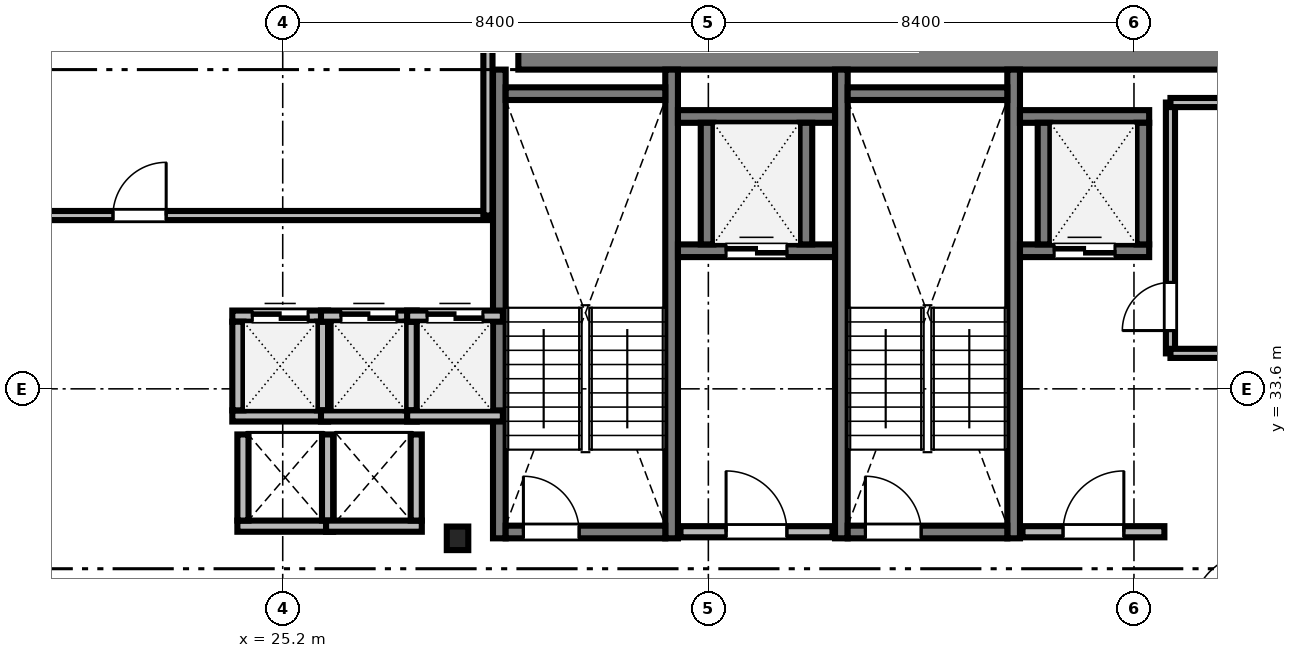
"""IFC4 building model, lengths in metres.
Left out: names, types, materials, properties, quantities, classifications, styles, units other than length and angle.
Written with IfcOpenShell. Run it as: python <this file> out.ifc"""

import sys

from ifc_helpers import new_model, si_unit, direction, frame, frame_2d, origin, origin_2d, place, context, subcontext, project, spatial, rectangle, i_section, extrude, source, transform, mapped, element, fill, save


model = new_model("IFC4")
c1 = context("Model", 3, precision=1e-05, world=origin(), true_north=direction((0.0, 1.0)))
c2 = subcontext(c1, "Body", "Model", "MODEL_VIEW")
j1 = project(units=[si_unit("LENGTHUNIT", "METRE"), si_unit("PLANEANGLEUNIT", "RADIAN")], contexts=[c1])
p1 = place(None, origin())
s1 = spatial("IfcSite", under=j1, at=p1, CompositionType="ELEMENT")
p2 = place(p1, origin())
s2 = spatial("IfcBuilding", under=s1, at=p2, CompositionType="ELEMENT")
p3 = place(p2, frame((0.0, 0.0, 122.4)))
s3 = spatial("IfcBuildingStorey", under=s2, at=p3, CompositionType="ELEMENT", Elevation=122.4)
m1 = source(origin(), c2, "Body", "SweptSolid", [
    extrude(rectangle(XDim=17.52, YDim=0.8, at=frame_2d((8.76, 0.0))), origin(), (0.0, 0.0, 1.0), 3.46),
])
p4 = place(p3, frame((29.85, 40.3, 0.0), z_axis=(0.0, 0.0, 1.0), x_axis=(1.0, 0.0, 0.0)))
e1 = element("IfcWall", 1, at=p4, inside=s3, PredefinedType="SHEAR", context=c2, shape_type="MappedRepresentation", body=[
    mapped(m1, transform((0.0, 0.0, 0.0), scale=1.0)),
])
m2 = source(origin(), c2, "Body", "SweptSolid", [
    extrude(i_section(OverallWidth=0.424, OverallDepth=0.465, WebThickness=0.035, FlangeThickness=0.056, FilletRadius=0.015, at=origin_2d()), origin(), (0.0, 0.0, 1.0), 3.46),
])
p5 = place(p3, frame((28.65, 30.65, 0.0), z_axis=(0.0, 0.0, 1.0), x_axis=(1.0, 0.0, 0.0)))
e2 = element("IfcColumn", 2, at=p5, inside=s3, PredefinedType="COLUMN", context=c2, shape_type="MappedRepresentation", body=[
    mapped(m2, transform((0.0, 0.0, 0.0), scale=1.0)),
])
m3 = source(origin(), c2, "Body", "SweptSolid", [
    extrude(rectangle(XDim=9.25, YDim=0.25, at=frame_2d((4.625, 0.0))), origin(), (0.0, 0.0, 1.0), 3.5),
])
for number, where, z_axis, x_axis in (
    (3, (29.475, 30.65, 0.0), (0.0, 0.0, 1.0), (0.0, 1.0, 0.0)),
    (4, (32.875, 30.65, 0.0), (0.0, 0.0, 1.0), (0.0, 1.0, 0.0)),
):
    element("IfcWall", number, at=place(p3, frame(where, z_axis=z_axis, x_axis=x_axis)), inside=s3, PredefinedType="SOLIDWALL", context=c2, shape_type="MappedRepresentation", body=[
        mapped(m3, transform((0.0, 0.0, 0.0), scale=1.0)),
    ])
m4 = source(origin(), c2, "Body", "SweptSolid", [
    extrude(rectangle(XDim=3.15, YDim=0.25, at=frame_2d((1.575, 0.0))), origin(), (0.0, 0.0, 1.0), 3.5),
])
p6 = place(p3, frame((29.6, 39.425, 0.0), z_axis=(0.0, 0.0, 1.0), x_axis=(1.0, 0.0, 0.0)))
e5 = element("IfcWall", 5, at=p6, inside=s3, PredefinedType="SOLIDWALL", context=c2, shape_type="MappedRepresentation", body=[
    mapped(m4, transform((0.0, 0.0, 0.0), scale=1.0)),
])
p7 = place(p3, frame((29.6, 30.775, 0.0), z_axis=(0.0, 0.0, 1.0), x_axis=(1.0, 0.0, 0.0)))
e6 = element("IfcWall", 6, at=p7, inside=s3, PredefinedType="SOLIDWALL", context=c2, shape_type="MappedRepresentation", body=[
    mapped(m4, transform((0.0, 0.0, 0.0), scale=1.0)),
])
m5 = source(origin(), c2, "Body", "SweptSolid", [
    extrude(rectangle(XDim=1.1, YDim=2.2, at=frame_2d((0.55, 1.1))), frame((0.0, 0.135, 0.0), z_axis=(0.0, -1.0, 0.0), x_axis=(1.0, 0.0, 0.0)), (0.0, 0.0, 1.0), 0.27),
])
p8 = place(p7, frame((0.35, 0.0, 0.0)))
e7 = element("IfcOpeningElement", 7, at=p8, cuts=e6, PredefinedType="OPENING", context=c2, shape_type="MappedRepresentation", body=[
    mapped(m5, transform((0.0, 0.0, 0.0), scale=1.0)),
])
for number, where, z_axis, x_axis in (
    (8, (36.225, 30.65, 0.0), (0.0, 0.0, 1.0), (0.0, 1.0, 0.0)),
    (9, (39.625, 30.65, 0.0), (0.0, 0.0, 1.0), (0.0, 1.0, 0.0)),
):
    element("IfcWall", number, at=place(p3, frame(where, z_axis=z_axis, x_axis=x_axis)), inside=s3, PredefinedType="SOLIDWALL", context=c2, shape_type="MappedRepresentation", body=[
        mapped(m3, transform((0.0, 0.0, 0.0), scale=1.0)),
    ])
p9 = place(p3, frame((36.35, 39.425, 0.0), z_axis=(0.0, 0.0, 1.0), x_axis=(1.0, 0.0, 0.0)))
e10 = element("IfcWall", 10, at=p9, inside=s3, PredefinedType="SOLIDWALL", context=c2, shape_type="MappedRepresentation", body=[
    mapped(m4, transform((0.0, 0.0, 0.0), scale=1.0)),
])
p10 = place(p3, frame((36.35, 30.775, 0.0), z_axis=(0.0, 0.0, 1.0), x_axis=(1.0, 0.0, 0.0)))
e11 = element("IfcWall", 11, at=p10, inside=s3, PredefinedType="SOLIDWALL", context=c2, shape_type="MappedRepresentation", body=[
    mapped(m4, transform((0.0, 0.0, 0.0), scale=1.0)),
])
p11 = place(p10, frame((0.35, 0.0, 0.0)))
e12 = element("IfcOpeningElement", 12, at=p11, cuts=e11, PredefinedType="OPENING", context=c2, shape_type="MappedRepresentation", body=[
    mapped(m5, transform((0.0, 0.0, 0.0), scale=1.0)),
])
m6 = source(origin(), c2, "Body", "SweptSolid", [
    extrude(rectangle(XDim=3.0, YDim=0.22, at=frame_2d((1.5, 0.0))), origin(), (0.0, 0.0, 1.0), 3.46),
])
p12 = place(p3, frame((33.05, 30.78, 0.0), z_axis=(0.0, 0.0, 1.0), x_axis=(1.0, 0.0, 0.0)))
e13 = element("IfcWall", 13, at=p12, inside=s3, PredefinedType="SOLIDWALL", context=c2, shape_type="MappedRepresentation", body=[
    mapped(m6, transform((0.0, 0.0, 0.0), scale=1.0)),
])
m7 = source(origin(), c2, "Body", "SweptSolid", [
    extrude(rectangle(XDim=1.2, YDim=2.2, at=frame_2d((0.6, 1.1))), frame((0.0, 0.12, 0.0), z_axis=(0.0, -1.0, 0.0), x_axis=(1.0, 0.0, 0.0)), (0.0, 0.0, 1.0), 0.24),
])
p13 = place(p12, frame((0.9, 0.0, 0.0)))
e14 = element("IfcOpeningElement", 14, at=p13, cuts=e13, PredefinedType="OPENING", context=c2, shape_type="MappedRepresentation", body=[
    mapped(m7, transform((0.0, 0.0, 0.0), scale=1.0)),
])
m8 = source(origin(), c2, "Body", "SweptSolid", [
    extrude(rectangle(XDim=2.8, YDim=0.22, at=frame_2d((1.4, 0.0))), origin(), (0.0, 0.0, 1.0), 3.46),
])
p14 = place(p3, frame((39.8, 30.78, 0.0), z_axis=(0.0, 0.0, 1.0), x_axis=(1.0, 0.0, 0.0)))
e15 = element("IfcWall", 15, at=p14, inside=s3, PredefinedType="SOLIDWALL", context=c2, shape_type="MappedRepresentation", body=[
    mapped(m8, transform((0.0, 0.0, 0.0), scale=1.0)),
])
p15 = place(p14, frame((0.8, 0.0, 0.0)))
e16 = element("IfcOpeningElement", 16, at=p15, cuts=e15, PredefinedType="OPENING", context=c2, shape_type="MappedRepresentation", body=[
    mapped(m7, transform((0.0, 0.0, 0.0), scale=1.0)),
])
m9 = source(origin(), c2, "Body", "SweptSolid", [
    extrude(rectangle(XDim=1.89, YDim=0.22, at=frame_2d((0.945, 0.0))), origin(), (0.0, 0.0, 1.0), 3.46),
])
p16 = place(p3, frame((24.205, 33.065, 0.0), z_axis=(0.0, 0.0, 1.0), x_axis=(1.0, 0.0, 0.0)))
e17 = element("IfcWall", 17, at=p16, inside=s3, PredefinedType="SOLIDWALL", context=c2, shape_type="MappedRepresentation", body=[
    mapped(m9, transform((0.0, 0.0, 0.0), scale=1.0)),
])
p17 = place(p3, frame((24.205, 35.035, 0.0), z_axis=(0.0, 0.0, 1.0), x_axis=(1.0, 0.0, 0.0)))
e18 = element("IfcWall", 18, at=p17, inside=s3, PredefinedType="SOLIDWALL", context=c2, shape_type="MappedRepresentation", body=[
    mapped(m9, transform((0.0, 0.0, 0.0), scale=1.0)),
])
m10 = source(origin(), c2, "Body", "SweptSolid", [
    extrude(rectangle(XDim=1.1, YDim=2.2, at=frame_2d((0.55, 1.1))), frame((0.0, 0.12, 0.0), z_axis=(0.0, -1.0, 0.0), x_axis=(1.0, 0.0, 0.0)), (0.0, 0.0, 1.0), 0.24),
])
p18 = place(p17, frame((0.395, 0.0, 0.0)))
e19 = element("IfcOpeningElement", 19, at=p18, cuts=e18, PredefinedType="OPENING", context=c2, shape_type="MappedRepresentation", body=[
    mapped(m10, transform((0.0, 0.0, 0.0), scale=1.0)),
])
m11 = source(origin(), c2, "Body", "SweptSolid", [
    extrude(rectangle(XDim=1.75, YDim=0.22, at=frame_2d((0.875, 0.0))), origin(), (0.0, 0.0, 1.0), 3.46),
])
for number, where, z_axis, x_axis in (
    (20, (24.315, 33.175, 0.0), (0.0, 0.0, 1.0), (0.0, 1.0, 0.0)),
    (21, (25.985, 33.175, 0.0), (0.0, 0.0, 1.0), (0.0, 1.0, 0.0)),
):
    element("IfcWall", number, at=place(p3, frame(where, z_axis=z_axis, x_axis=x_axis)), inside=s3, PredefinedType="SOLIDWALL", context=c2, shape_type="MappedRepresentation", body=[
        mapped(m11, transform((0.0, 0.0, 0.0), scale=1.0)),
    ])
p19 = place(p3, frame((25.955, 33.065, 0.0), z_axis=(0.0, 0.0, 1.0), x_axis=(1.0, 0.0, 0.0)))
e22 = element("IfcWall", 22, at=p19, inside=s3, PredefinedType="SOLIDWALL", context=c2, shape_type="MappedRepresentation", body=[
    mapped(m9, transform((0.0, 0.0, 0.0), scale=1.0)),
])
p20 = place(p3, frame((25.955, 35.035, 0.0), z_axis=(0.0, 0.0, 1.0), x_axis=(1.0, 0.0, 0.0)))
e23 = element("IfcWall", 23, at=p20, inside=s3, PredefinedType="SOLIDWALL", context=c2, shape_type="MappedRepresentation", body=[
    mapped(m9, transform((0.0, 0.0, 0.0), scale=1.0)),
])
p21 = place(p20, frame((0.395, 0.0, 0.0)))
e24 = element("IfcOpeningElement", 24, at=p21, cuts=e23, PredefinedType="OPENING", context=c2, shape_type="MappedRepresentation", body=[
    mapped(m10, transform((0.0, 0.0, 0.0), scale=1.0)),
])
p22 = place(p3, frame((27.735, 33.175, 0.0), z_axis=(0.0, 0.0, 1.0), x_axis=(0.0, 1.0, 0.0)))
e25 = element("IfcWall", 25, at=p22, inside=s3, PredefinedType="SOLIDWALL", context=c2, shape_type="MappedRepresentation", body=[
    mapped(m11, transform((0.0, 0.0, 0.0), scale=1.0)),
])
p23 = place(p3, frame((27.655, 33.065, 0.0), z_axis=(0.0, 0.0, 1.0), x_axis=(1.0, 0.0, 0.0)))
e26 = element("IfcWall", 26, at=p23, inside=s3, PredefinedType="SOLIDWALL", context=c2, shape_type="MappedRepresentation", body=[
    mapped(m9, transform((0.0, 0.0, 0.0), scale=1.0)),
])
p24 = place(p3, frame((27.655, 35.035, 0.0), z_axis=(0.0, 0.0, 1.0), x_axis=(1.0, 0.0, 0.0)))
e27 = element("IfcWall", 27, at=p24, inside=s3, PredefinedType="SOLIDWALL", context=c2, shape_type="MappedRepresentation", body=[
    mapped(m9, transform((0.0, 0.0, 0.0), scale=1.0)),
])
p25 = place(p24, frame((0.395, 0.0, 0.0)))
e28 = element("IfcOpeningElement", 28, at=p25, cuts=e27, PredefinedType="OPENING", context=c2, shape_type="MappedRepresentation", body=[
    mapped(m10, transform((0.0, 0.0, 0.0), scale=1.0)),
])
m12 = source(origin(), c2, "Body", "SweptSolid", [
    extrude(rectangle(XDim=3.1, YDim=0.25, at=frame_2d((1.55, 0.0))), origin(), (0.0, 0.0, 1.0), 3.46),
])
p26 = place(p3, frame((33.0, 36.325, 0.0), z_axis=(0.0, 0.0, 1.0), x_axis=(1.0, 0.0, 0.0)))
e29 = element("IfcWall", 29, at=p26, inside=s3, PredefinedType="SOLIDWALL", context=c2, shape_type="MappedRepresentation", body=[
    mapped(m12, transform((0.0, 0.0, 0.0), scale=1.0)),
])
m13 = source(origin(), c2, "Body", "SweptSolid", [
    extrude(rectangle(XDim=1.2, YDim=2.25, at=frame_2d((0.6, 1.125))), frame((0.0, 0.135, 0.0), z_axis=(0.0, -1.0, 0.0), x_axis=(1.0, 0.0, 0.0)), (0.0, 0.0, 1.0), 0.27),
])
p27 = place(p26, frame((0.95, 0.0, 0.0)))
e30 = element("IfcOpeningElement", 30, at=p27, cuts=e29, PredefinedType="OPENING", context=c2, shape_type="MappedRepresentation", body=[
    mapped(m13, transform((0.0, 0.0, 0.0), scale=1.0)),
])
p28 = place(p3, frame((33.0, 38.975, 0.0), z_axis=(0.0, 0.0, 1.0), x_axis=(1.0, 0.0, 0.0)))
e31 = element("IfcWall", 31, at=p28, inside=s3, PredefinedType="SOLIDWALL", context=c2, shape_type="MappedRepresentation", body=[
    mapped(m12, transform((0.0, 0.0, 0.0), scale=1.0)),
])
m14 = source(origin(), c2, "Body", "SweptSolid", [
    extrude(rectangle(XDim=2.4, YDim=0.25, at=frame_2d((1.2, 0.0))), origin(), (0.0, 0.0, 1.0), 3.46),
])
for number, where, z_axis, x_axis in (
    (32, (33.575, 36.45, 0.0), (0.0, 0.0, 1.0), (0.0, 1.0, 0.0)),
    (33, (35.525, 36.45, 0.0), (0.0, 0.0, 1.0), (0.0, 1.0, 0.0)),
):
    element("IfcWall", number, at=place(p3, frame(where, z_axis=z_axis, x_axis=x_axis)), inside=s3, PredefinedType="SOLIDWALL", context=c2, shape_type="MappedRepresentation", body=[
        mapped(m14, transform((0.0, 0.0, 0.0), scale=1.0)),
    ])
m15 = source(origin(), c2, "Body", "SweptSolid", [
    extrude(rectangle(XDim=2.55, YDim=0.25, at=frame_2d((1.275, 0.0))), origin(), (0.0, 0.0, 1.0), 3.46),
])
p29 = place(p3, frame((39.75, 36.325, 0.0), z_axis=(0.0, 0.0, 1.0), x_axis=(1.0, 0.0, 0.0)))
e34 = element("IfcWall", 34, at=p29, inside=s3, PredefinedType="SOLIDWALL", context=c2, shape_type="MappedRepresentation", body=[
    mapped(m15, transform((0.0, 0.0, 0.0), scale=1.0)),
])
p30 = place(p29, frame((0.675, 0.0, 0.0)))
e35 = element("IfcOpeningElement", 35, at=p30, cuts=e34, PredefinedType="OPENING", context=c2, shape_type="MappedRepresentation", body=[
    mapped(m13, transform((0.0, 0.0, 0.0), scale=1.0)),
])
p31 = place(p3, frame((39.75, 38.975, 0.0), z_axis=(0.0, 0.0, 1.0), x_axis=(1.0, 0.0, 0.0)))
e36 = element("IfcWall", 36, at=p31, inside=s3, PredefinedType="SOLIDWALL", context=c2, shape_type="MappedRepresentation", body=[
    mapped(m15, transform((0.0, 0.0, 0.0), scale=1.0)),
])
for number, where, z_axis, x_axis in (
    (37, (40.225, 36.45, 0.0), (0.0, 0.0, 1.0), (0.0, 1.0, 0.0)),
    (38, (42.175, 36.45, 0.0), (0.0, 0.0, 1.0), (0.0, 1.0, 0.0)),
):
    element("IfcWall", number, at=place(p3, frame(where, z_axis=z_axis, x_axis=x_axis)), inside=s3, PredefinedType="SOLIDWALL", context=c2, shape_type="MappedRepresentation", body=[
        mapped(m14, transform((0.0, 0.0, 0.0), scale=1.0)),
    ])
m16 = source(origin(), c2, "Body", "SweptSolid", [
    extrude(rectangle(XDim=1.89, YDim=0.22, at=frame_2d((0.945, 0.0))), origin(), (0.0, 0.0, 1.0), 3.46),
])
p32 = place(p3, frame((24.305, 30.89, 0.0), z_axis=(0.0, 0.0, 1.0), x_axis=(1.0, 0.0, 0.0)))
e39 = element("IfcWall", 39, at=p32, inside=s3, PredefinedType="SOLIDWALL", context=c2, shape_type="MappedRepresentation", body=[
    mapped(m16, transform((0.0, 0.0, 0.0), scale=1.0)),
])
m17 = source(origin(), c2, "Body", "SweptSolid", [
    extrude(rectangle(XDim=1.7, YDim=0.22, at=frame_2d((0.85, 0.0))), origin(), (0.0, 0.0, 1.0), 3.46),
])
for number, where, z_axis, x_axis in (
    (40, (24.415, 31.0, 0.0), (0.0, 0.0, 1.0), (0.0, 1.0, 0.0)),
    (41, (26.085, 31.0, 0.0), (0.0, 0.0, 1.0), (0.0, 1.0, 0.0)),
):
    element("IfcWall", number, at=place(p3, frame(where, z_axis=z_axis, x_axis=x_axis)), inside=s3, PredefinedType="SOLIDWALL", context=c2, shape_type="MappedRepresentation", body=[
        mapped(m17, transform((0.0, 0.0, 0.0), scale=1.0)),
    ])
p33 = place(p3, frame((26.055, 30.89, 0.0), z_axis=(0.0, 0.0, 1.0), x_axis=(1.0, 0.0, 0.0)))
e42 = element("IfcWall", 42, at=p33, inside=s3, PredefinedType="SOLIDWALL", context=c2, shape_type="MappedRepresentation", body=[
    mapped(m16, transform((0.0, 0.0, 0.0), scale=1.0)),
])
p34 = place(p3, frame((27.835, 31.0, 0.0), z_axis=(0.0, 0.0, 1.0), x_axis=(0.0, 1.0, 0.0)))
e43 = element("IfcWall", 43, at=p34, inside=s3, PredefinedType="SOLIDWALL", context=c2, shape_type="MappedRepresentation", body=[
    mapped(m17, transform((0.0, 0.0, 0.0), scale=1.0)),
])
m18 = source(origin(), c2, "Body", "SweptSolid", [
    extrude(rectangle(XDim=22.328, YDim=0.18, at=frame_2d((11.164, 0.0))), origin(), (0.0, 0.0, 1.0), 2.702),
])
p35 = place(p3, frame((6.922, 37.02, 0.0), z_axis=(0.0, 0.0, 1.0), x_axis=(1.0, 0.0, 0.0)))
e44 = element("IfcWall", 44, at=p35, inside=s3, PredefinedType="PARTITIONING", context=c2, shape_type="MappedRepresentation", body=[
    mapped(m18, transform((0.0, 0.0, 0.0), scale=1.0)),
])
m19 = source(origin(), c2, "Body", "SweptSolid", [
    extrude(rectangle(XDim=1.05, YDim=2.2, at=frame_2d((0.525, 1.1))), frame((0.0, 0.1, 0.0), z_axis=(0.0, -1.0, 0.0), x_axis=(1.0, 0.0, 0.0)), (0.0, 0.0, 1.0), 0.2),
])
p36 = place(p35, frame((14.928, 0.0, 0.0)))
e45 = element("IfcOpeningElement", 45, at=p36, cuts=e44, PredefinedType="OPENING", context=c2, shape_type="MappedRepresentation", body=[
    mapped(m19, transform((0.0, 0.0, 0.0), scale=1.0)),
])
m20 = source(origin(), c2, "Body", "SweptSolid", [
    extrude(rectangle(XDim=4.95, YDim=0.18, at=frame_2d((2.475, 0.0))), origin(), (0.0, 0.0, 1.0), 3.46),
])
p37 = place(p3, frame((42.72, 34.3, 0.0), z_axis=(0.0, 0.0, 1.0), x_axis=(0.0, 1.0, 0.0)))
e46 = element("IfcWall", 46, at=p37, inside=s3, PredefinedType="PARTITIONING", context=c2, shape_type="MappedRepresentation", body=[
    mapped(m20, transform((0.0, 0.0, 0.0), scale=1.0)),
])
m21 = source(origin(), c2, "Body", "SweptSolid", [
    extrude(rectangle(XDim=0.95, YDim=2.15, at=frame_2d((0.475, 1.075))), frame((0.0, 0.1, 0.0), z_axis=(0.0, -1.0, 0.0), x_axis=(1.0, 0.0, 0.0)), (0.0, 0.0, 1.0), 0.2),
])
p38 = place(p37, frame((0.45, 0.0, 0.0)))
e47 = element("IfcOpeningElement", 47, at=p38, cuts=e46, PredefinedType="OPENING", context=c2, shape_type="MappedRepresentation", body=[
    mapped(m21, transform((0.0, 0.0, 0.0), scale=1.0)),
])
m22 = source(origin(), c2, "Body", "SweptSolid", [
    extrude(rectangle(XDim=11.45, YDim=0.18, at=frame_2d((5.725, 0.0))), origin(), (0.0, 0.0, 1.0), 2.702),
])
p39 = place(p3, frame((29.25, 37.02, 0.0), z_axis=(0.0, 0.0, 1.0), x_axis=(0.0, 1.0, 0.0)))
e48 = element("IfcWall", 48, at=p39, inside=s3, PredefinedType="PARTITIONING", context=c2, shape_type="MappedRepresentation", body=[
    mapped(m22, transform((0.0, 0.0, 0.0), scale=1.0)),
])
m23 = source(origin(), c2, "Body", "SweptSolid", [
    extrude(rectangle(XDim=1.128, YDim=0.18, at=frame_2d((0.564, 0.0))), origin(), (0.0, 0.0, 1.0), 3.46),
])
for number, where, z_axis, x_axis in (
    (49, (42.72, 34.3, 0.0), (0.0, 0.0, 1.0), (1.0, 0.0, 0.0)),
    (50, (42.72, 39.25, 0.0), (0.0, 0.0, 1.0), (1.0, 0.0, 0.0)),
):
    element("IfcWall", number, at=place(p3, frame(where, z_axis=z_axis, x_axis=x_axis)), inside=s3, PredefinedType="PARTITIONING", context=c2, shape_type="MappedRepresentation", body=[
        mapped(m23, transform((0.0, 0.0, 0.0), scale=1.0)),
    ])
m24 = source(origin(), c2, "Body", "SweptSolid", [
    extrude(rectangle(XDim=1.1, YDim=2.2, at=frame_2d((0.55, 1.1))), frame((0.0, 0.025, 0.0), z_axis=(0.0, -1.0, 0.0), x_axis=(1.0, 0.0, 0.0)), (0.0, 0.0, 1.0), 0.05),
])
p40 = place(p8, origin())
e51 = element("IfcDoor", 51, at=p40, inside=s3, OperationType="SINGLE_SWING_LEFT", PredefinedType="DOOR", context=c2, shape_type="MappedRepresentation", body=[
    mapped(m24, transform((0.0, 0.0, 0.0), scale=1.0)),
])
fill(e7, e51)
p41 = place(p11, origin())
e52 = element("IfcDoor", 52, at=p41, inside=s3, OperationType="SINGLE_SWING_LEFT", PredefinedType="DOOR", context=c2, shape_type="MappedRepresentation", body=[
    mapped(m24, transform((0.0, 0.0, 0.0), scale=1.0)),
])
fill(e12, e52)
m25 = source(origin(), c2, "Body", "SweptSolid", [
    extrude(rectangle(XDim=1.2, YDim=2.2, at=frame_2d((0.6, 1.1))), frame((0.0, 0.025, 0.0), z_axis=(0.0, -1.0, 0.0), x_axis=(1.0, 0.0, 0.0)), (0.0, 0.0, 1.0), 0.05),
])
p42 = place(p13, origin())
e53 = element("IfcDoor", 53, at=p42, inside=s3, OperationType="SINGLE_SWING_LEFT", PredefinedType="DOOR", context=c2, shape_type="MappedRepresentation", body=[
    mapped(m25, transform((0.0, 0.0, 0.0), scale=1.0)),
])
fill(e14, e53)
p43 = place(p15, origin())
e54 = element("IfcDoor", 54, at=p43, inside=s3, OperationType="SINGLE_SWING_RIGHT", PredefinedType="DOOR", context=c2, shape_type="MappedRepresentation", body=[
    mapped(m25, transform((0.0, 0.0, 0.0), scale=1.0)),
])
fill(e16, e54)
p44 = place(p18, origin())
e55 = element("IfcDoor", 55, at=p44, inside=s3, OperationType="DOUBLE_DOOR_SLIDING", PredefinedType="DOOR", context=c2, shape_type="MappedRepresentation", body=[
    mapped(m24, transform((0.0, 0.0, 0.0), scale=1.0)),
])
fill(e19, e55)
p45 = place(p21, origin())
e56 = element("IfcDoor", 56, at=p45, inside=s3, OperationType="DOUBLE_DOOR_SLIDING", PredefinedType="DOOR", context=c2, shape_type="MappedRepresentation", body=[
    mapped(m24, transform((0.0, 0.0, 0.0), scale=1.0)),
])
fill(e24, e56)
p46 = place(p25, origin())
e57 = element("IfcDoor", 57, at=p46, inside=s3, OperationType="DOUBLE_DOOR_SLIDING", PredefinedType="DOOR", context=c2, shape_type="MappedRepresentation", body=[
    mapped(m24, transform((0.0, 0.0, 0.0), scale=1.0)),
])
fill(e28, e57)
m26 = source(origin(), c2, "Body", "SweptSolid", [
    extrude(rectangle(XDim=1.2, YDim=2.25, at=frame_2d((0.6, 1.125))), frame((0.0, 0.025, 0.0), z_axis=(0.0, -1.0, 0.0), x_axis=(1.0, 0.0, 0.0)), (0.0, 0.0, 1.0), 0.05),
])
p47 = place(p27, origin())
e58 = element("IfcDoor", 58, at=p47, inside=s3, OperationType="DOUBLE_DOOR_SLIDING", PredefinedType="DOOR", context=c2, shape_type="MappedRepresentation", body=[
    mapped(m26, transform((0.0, 0.0, 0.0), scale=1.0)),
])
fill(e30, e58)
p48 = place(p30, origin())
e59 = element("IfcDoor", 59, at=p48, inside=s3, OperationType="DOUBLE_DOOR_SLIDING", PredefinedType="DOOR", context=c2, shape_type="MappedRepresentation", body=[
    mapped(m26, transform((0.0, 0.0, 0.0), scale=1.0)),
])
fill(e35, e59)
m27 = source(origin(), c2, "Body", "SweptSolid", [
    extrude(rectangle(XDim=1.05, YDim=2.2, at=frame_2d((0.525, 1.1))), frame((0.0, 0.025, 0.0), z_axis=(0.0, -1.0, 0.0), x_axis=(1.0, 0.0, 0.0)), (0.0, 0.0, 1.0), 0.05),
])
p49 = place(p36, origin())
e60 = element("IfcDoor", 60, at=p49, inside=s3, OperationType="SINGLE_SWING_RIGHT", PredefinedType="DOOR", context=c2, shape_type="MappedRepresentation", body=[
    mapped(m27, transform((0.0, 0.0, 0.0), scale=1.0)),
])
fill(e45, e60)
m28 = source(origin(), c2, "Body", "SweptSolid", [
    extrude(rectangle(XDim=0.95, YDim=2.15, at=frame_2d((0.475, 1.075))), frame((0.0, 0.025, 0.0), z_axis=(0.0, -1.0, 0.0), x_axis=(1.0, 0.0, 0.0)), (0.0, 0.0, 1.0), 0.05),
])
p50 = place(p38, origin())
e61 = element("IfcDoor", 61, at=p50, inside=s3, OperationType="SINGLE_SWING_LEFT", PredefinedType="DOOR", context=c2, shape_type="MappedRepresentation", body=[
    mapped(m28, transform((0.0, 0.0, 0.0), scale=1.0)),
])
fill(e47, e61)
save(model, sys.argv[1])
